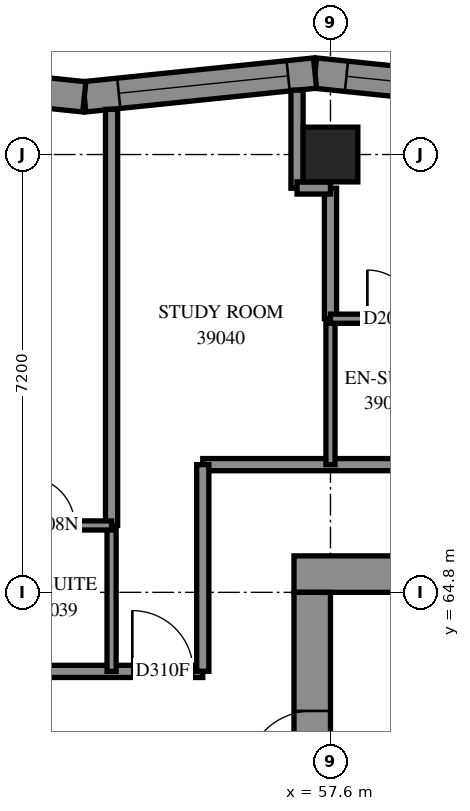
"""IFC4 building model, lengths in metres.
Left out: names, types, materials, properties, quantities, classifications, styles, units other than length and angle.
Written with IfcOpenShell. Run it as: python <this file> out.ifc"""

import sys

from ifc_helpers import new_model, si_unit, direction, frame, frame_2d, origin, origin_2d, place, context, subcontext, project, spatial, polyline, rectangle, outline, extrude, element, fill, save


model = new_model("IFC4")
c1 = context("Model", 3, precision=1e-05, world=origin(), true_north=direction((0.0, 1.0)))
c2 = subcontext(c1, "Body", "Model", "MODEL_VIEW")
j1 = project(units=[si_unit("LENGTHUNIT", "METRE"), si_unit("PLANEANGLEUNIT", "RADIAN")], contexts=[c1])
p1 = place(None, origin())
s1 = spatial("IfcSite", under=j1, at=p1, CompositionType="ELEMENT")
p2 = place(p1, origin())
s2 = spatial("IfcBuilding", under=s1, at=p2, CompositionType="ELEMENT")
p3 = place(p2, frame((0.0, 0.0, 145.6)))
s3 = spatial("IfcBuildingStorey", under=s2, at=p3, CompositionType="ELEMENT", Elevation=145.6)
p4 = place(p3, frame((57.6, 72.0, 0.0), z_axis=(0.0, 0.0, 1.0), x_axis=(1.0, 0.0, 0.0)))
e1 = element("IfcColumn", 1, at=p4, inside=s3, PredefinedType="COLUMN", context=c2, shape_type="SweptSolid", body=[
    extrude(rectangle(XDim=0.9, YDim=0.9, at=origin_2d()), origin(), (0.0, 0.0, 1.0), 3.1),
])
p5 = place(p3, frame((57.0, 65.1, -0.3), z_axis=(0.0, 0.0, 1.0), x_axis=(1.0, 0.0, 0.0)))
e2 = element("IfcWall", 2, at=p5, inside=s3, PredefinedType="SHEAR", context=c2, shape_type="SweptSolid", body=[
    extrude(rectangle(XDim=15.6, YDim=0.6, at=frame_2d((7.8, 0.0))), origin(), (0.0, 0.0, 1.0), 2.7),
])
p6 = place(p5, frame((10.6, 0.0, 0.3)))
e3 = element("IfcOpeningElement", 3, at=p6, cuts=e2, PredefinedType="OPENING", context=c2, shape_type="SweptSolid", body=[
    extrude(rectangle(XDim=0.8, YDim=2.1, at=frame_2d((0.4, 1.05))), frame((0.0, 0.31, 0.0), z_axis=(0.0, -1.0, 0.0), x_axis=(1.0, 0.0, 0.0)), (0.0, 0.0, 1.0), 0.62),
])
p7 = place(p3, frame((57.3, 50.4, -0.3), z_axis=(0.0, 0.0, 1.0), x_axis=(0.0, 1.0, 0.0)))
e4 = element("IfcWall", 4, at=p7, inside=s3, PredefinedType="SHEAR", context=c2, shape_type="SweptSolid", body=[
    extrude(rectangle(XDim=14.4, YDim=0.6, at=frame_2d((7.2, 0.0))), origin(), (0.0, 0.0, 1.0), 2.7),
])
p8 = place(p7, frame((4.55, 0.0, 0.3)))
e5 = element("IfcOpeningElement", 5, at=p8, cuts=e4, PredefinedType="OPENING", context=c2, shape_type="SweptSolid", body=[
    extrude(rectangle(XDim=1.1, YDim=2.1, at=frame_2d((0.55, 1.05))), frame((0.0, 0.31, 0.0), z_axis=(0.0, -1.0, 0.0), x_axis=(1.0, 0.0, 0.0)), (0.0, 0.0, 1.0), 0.62),
])
p9 = place(p7, frame((11.35, 0.0, 0.3)))
e6 = element("IfcOpeningElement", 6, at=p9, cuts=e4, PredefinedType="OPENING", context=c2, shape_type="SweptSolid", body=[
    extrude(rectangle(XDim=1.1, YDim=2.1, at=frame_2d((0.55, 1.05))), frame((0.0, 0.31, 0.0), z_axis=(0.0, -1.0, 0.0), x_axis=(1.0, 0.0, 0.0)), (0.0, 0.0, 1.0), 0.62),
])
p10 = place(p3, frame((61.139, 72.949, 0.0), z_axis=(0.0, 0.0, 1.0), x_axis=(-0.9947306832, 0.1025225234, 0.0)))
e7 = element("IfcWall", 7, at=p10, inside=s3, PredefinedType="SOLIDWALL", context=c2, shape_type="SweptSolid", body=[
    extrude(outline(polyline([(0.026, -0.25), (3.84, -0.25), (3.788, 0.25), (-0.026, 0.25), (0.026, -0.25)])), origin(), (0.0, 0.0, 1.0), 3.1),
])
p11 = place(p10, frame((0.494, 0.0, 0.45)))
e8 = element("IfcOpeningElement", 8, at=p11, cuts=e7, PredefinedType="OPENING", context=c2, shape_type="SweptSolid", body=[
    extrude(rectangle(XDim=2.8, YDim=2.5, at=frame_2d((1.4, 1.25))), frame((0.0, 0.26, 0.0), z_axis=(0.0, -1.0, 0.0), x_axis=(1.0, 0.0, 0.0)), (0.0, 0.0, 1.0), 0.52),
])
p12 = place(p3, frame((57.346, 73.34, 0.0), z_axis=(0.0, 0.0, 1.0), x_axis=(-0.9947304076, -0.1025251975, 0.0)))
e9 = element("IfcWall", 9, at=p12, inside=s3, PredefinedType="SOLIDWALL", context=c2, shape_type="SweptSolid", body=[
    extrude(outline(polyline([(-0.026, -0.25), (3.788, -0.25), (3.84, 0.25), (0.026, 0.25), (-0.026, -0.25)])), origin(), (0.0, 0.0, 1.0), 3.1),
])
p13 = place(p12, frame((0.445, 0.0, 0.45)))
e10 = element("IfcOpeningElement", 10, at=p13, cuts=e9, PredefinedType="OPENING", context=c2, shape_type="SweptSolid", body=[
    extrude(rectangle(XDim=2.8, YDim=2.5, at=frame_2d((1.4, 1.25))), frame((0.0, 0.26, 0.0), z_axis=(0.0, -1.0, 0.0), x_axis=(1.0, 0.0, 0.0)), (0.0, 0.0, 1.0), 0.52),
])
p14 = place(p3, frame((53.552, 72.949, 0.0), z_axis=(0.0, 0.0, 1.0), x_axis=(-0.9947306832, 0.1025225234, 0.0)))
e11 = element("IfcWall", 11, at=p14, inside=s3, PredefinedType="SOLIDWALL", context=c2, shape_type="SweptSolid", body=[
    extrude(outline(polyline([(0.026, -0.25), (3.84, -0.25), (3.788, 0.25), (-0.026, 0.25), (0.026, -0.25)])), origin(), (0.0, 0.0, 1.0), 3.1),
])
p15 = place(p14, frame((1.084, 0.0, 0.45)))
e12 = element("IfcOpeningElement", 12, at=p15, cuts=e11, PredefinedType="OPENING", context=c2, shape_type="SweptSolid", body=[
    extrude(rectangle(XDim=1.2, YDim=2.5, at=frame_2d((0.6, 1.25))), frame((0.0, 0.26, 0.0), z_axis=(0.0, -1.0, 0.0), x_axis=(1.0, 0.0, 0.0)), (0.0, 0.0, 1.0), 0.52),
])
p16 = place(p3, frame((55.5, 66.9, 0.0), z_axis=(0.0, 0.0, 1.0), x_axis=(1.0, 0.0, 0.0)))
e13 = element("IfcWall", 13, at=p16, inside=s3, PredefinedType="PARTITIONING", context=c2, shape_type="SweptSolid", body=[
    extrude(rectangle(XDim=18.6, YDim=0.2, at=frame_2d((9.3, 0.0))), origin(), (0.0, 0.0, 1.0), 3.1),
])
p17 = place(p16, frame((4.4, 0.0, 0.0)))
e14 = element("IfcOpeningElement", 14, at=p17, cuts=e13, PredefinedType="OPENING", context=c2, shape_type="SweptSolid", body=[
    extrude(rectangle(XDim=0.9, YDim=2.1, at=frame_2d((0.45, 1.05))), frame((0.0, 0.11, 0.0), z_axis=(0.0, -1.0, 0.0), x_axis=(1.0, 0.0, 0.0)), (0.0, 0.0, 1.0), 0.22),
])
p18 = place(p16, frame((6.1, 0.0, 0.0)))
e15 = element("IfcOpeningElement", 15, at=p18, cuts=e13, PredefinedType="OPENING", context=c2, shape_type="SweptSolid", body=[
    extrude(rectangle(XDim=0.9, YDim=2.1, at=frame_2d((0.45, 1.05))), frame((0.0, 0.11, 0.0), z_axis=(0.0, -1.0, 0.0), x_axis=(1.0, 0.0, 0.0)), (0.0, 0.0, 1.0), 0.22),
])
p19 = place(p16, frame((11.65, 0.0, 0.0)))
e16 = element("IfcOpeningElement", 16, at=p19, cuts=e13, PredefinedType="OPENING", context=c2, shape_type="SweptSolid", body=[
    extrude(rectangle(XDim=0.9, YDim=2.1, at=frame_2d((0.45, 1.05))), frame((0.0, 0.11, 0.0), z_axis=(0.0, -1.0, 0.0), x_axis=(1.0, 0.0, 0.0)), (0.0, 0.0, 1.0), 0.22),
])
p20 = place(p16, frame((13.3, 0.0, 0.0)))
e17 = element("IfcOpeningElement", 17, at=p20, cuts=e13, PredefinedType="OPENING", context=c2, shape_type="SweptSolid", body=[
    extrude(rectangle(XDim=0.9, YDim=2.1, at=frame_2d((0.45, 1.05))), frame((0.0, 0.11, 0.0), z_axis=(0.0, -1.0, 0.0), x_axis=(1.0, 0.0, 0.0)), (0.0, 0.0, 1.0), 0.22),
])
p21 = place(p3, frame((54.0, 65.9, 0.0), z_axis=(0.0, 0.0, 1.0), x_axis=(0.0, 1.0, 0.0)))
e18 = element("IfcWall", 18, at=p21, inside=s3, PredefinedType="PARTITIONING", context=c2, shape_type="SweptSolid", body=[
    extrude(rectangle(XDim=6.843, YDim=0.2, at=frame_2d((3.422, 0.0))), origin(), (0.0, 0.0, 1.0), 3.1),
])
p22 = place(p3, frame((50.4, 63.5, 0.0), z_axis=(0.0, 0.0, 1.0), x_axis=(1.0, 0.0, 0.0)))
e19 = element("IfcWall", 19, at=p22, inside=s3, PredefinedType="PARTITIONING", context=c2, shape_type="SweptSolid", body=[
    extrude(rectangle(XDim=5.1, YDim=0.2, at=frame_2d((2.55, 0.0))), origin(), (0.0, 0.0, 1.0), 3.1),
])
p23 = place(p22, frame((0.552, 0.0, 0.0)))
e20 = element("IfcOpeningElement", 20, at=p23, cuts=e19, PredefinedType="OPENING", context=c2, shape_type="SweptSolid", body=[
    extrude(rectangle(XDim=0.9, YDim=2.1, at=frame_2d((0.45, 1.05))), frame((0.0, 0.11, 0.0), z_axis=(0.0, -1.0, 0.0), x_axis=(1.0, 0.0, 0.0)), (0.0, 0.0, 1.0), 0.22),
])
p24 = place(p22, frame((3.941, 0.0, 0.0)))
e21 = element("IfcOpeningElement", 21, at=p24, cuts=e19, PredefinedType="OPENING", context=c2, shape_type="SweptSolid", body=[
    extrude(rectangle(XDim=1.0, YDim=2.1, at=frame_2d((0.5, 1.05))), frame((0.0, 0.11, 0.0), z_axis=(0.0, -1.0, 0.0), x_axis=(1.0, 0.0, 0.0)), (0.0, 0.0, 1.0), 0.22),
])
p25 = place(p3, frame((55.5, 63.502, 0.0), z_axis=(0.0, 0.0, 1.0), x_axis=(0.0, 1.0, 0.0)))
e22 = element("IfcWall", 22, at=p25, inside=s3, PredefinedType="PARTITIONING", context=c2, shape_type="SweptSolid", body=[
    extrude(rectangle(XDim=3.398, YDim=0.2, at=frame_2d((1.699, 0.0))), origin(), (0.0, 0.0, 1.0), 3.1),
])
for number, where, z_axis, x_axis in (
    (23, (54.0, 63.5, 0.0), (0.0, 0.0, 1.0), (0.0, 1.0, 0.0)),
    (24, (57.6, 66.9, 0.0), (0.0, 0.0, 1.0), (0.0, 1.0, 0.0)),
):
    element("IfcWall", number, at=place(p3, frame(where, z_axis=z_axis, x_axis=x_axis)), inside=s3, PredefinedType="PARTITIONING", context=c2, shape_type="SweptSolid", body=[
        extrude(rectangle(XDim=2.4, YDim=0.15, at=frame_2d((1.2, 0.0))), origin(), (0.0, 0.0, 1.0), 3.1),
    ])
p26 = place(p3, frame((57.6, 69.3, 0.0), z_axis=(0.0, 0.0, 1.0), x_axis=(0.0, 1.0, 0.0)))
e25 = element("IfcWall", 25, at=p26, inside=s3, PredefinedType="PARTITIONING", context=c2, shape_type="SweptSolid", body=[
    extrude(rectangle(XDim=2.146, YDim=0.2, at=frame_2d((1.073, 0.0))), origin(), (0.0, 0.0, 1.0), 3.1),
])
p27 = place(p3, frame((52.1, 65.9, 0.0), z_axis=(0.0, 0.0, 1.0), x_axis=(1.0, 0.0, 0.0)))
e26 = element("IfcWall", 26, at=p27, inside=s3, PredefinedType="PARTITIONING", context=c2, shape_type="SweptSolid", body=[
    extrude(rectangle(XDim=1.9, YDim=0.15, at=frame_2d((0.95, 0.0))), origin(), (0.0, 0.0, 1.0), 3.1),
])
p28 = place(p27, frame((0.493, 0.0, 0.0)))
e27 = element("IfcOpeningElement", 27, at=p28, cuts=e26, PredefinedType="OPENING", context=c2, shape_type="SweptSolid", body=[
    extrude(rectangle(XDim=0.8, YDim=2.1, at=frame_2d((0.4, 1.05))), frame((0.0, 0.085, 0.0), z_axis=(0.0, -1.0, 0.0), x_axis=(1.0, 0.0, 0.0)), (0.0, 0.0, 1.0), 0.17),
])
p29 = place(p3, frame((57.6, 69.3, 0.0), z_axis=(0.0, 0.0, 1.0), x_axis=(1.0, 0.0, 0.0)))
e28 = element("IfcWall", 28, at=p29, inside=s3, PredefinedType="PARTITIONING", context=c2, shape_type="SweptSolid", body=[
    extrude(rectangle(XDim=1.9, YDim=0.15, at=frame_2d((0.95, 0.0))), origin(), (0.0, 0.0, 1.0), 3.1),
])
p30 = place(p29, frame((0.607, 0.0, 0.0)))
e29 = element("IfcOpeningElement", 29, at=p30, cuts=e28, PredefinedType="OPENING", context=c2, shape_type="SweptSolid", body=[
    extrude(rectangle(XDim=0.8, YDim=2.1, at=frame_2d((0.4, 1.05))), frame((0.0, 0.085, 0.0), z_axis=(0.0, -1.0, 0.0), x_axis=(1.0, 0.0, 0.0)), (0.0, 0.0, 1.0), 0.17),
])
p31 = place(p3, frame((57.05, 71.446, 0.0), z_axis=(0.0, 0.0, 1.0), x_axis=(0.0, 1.0, 0.0)))
e30 = element("IfcWall", 30, at=p31, inside=s3, PredefinedType="PARTITIONING", context=c2, shape_type="SweptSolid", body=[
    extrude(rectangle(XDim=1.612, YDim=0.2, at=frame_2d((0.806, 0.0))), origin(), (0.0, 0.0, 1.0), 3.1),
])
p32 = place(p3, frame((57.05, 71.45, 0.0), z_axis=(0.0, 0.0, 1.0), x_axis=(1.0, 0.0, 0.0)))
e31 = element("IfcWall", 31, at=p32, inside=s3, PredefinedType="PARTITIONING", context=c2, shape_type="SweptSolid", body=[
    extrude(rectangle(XDim=0.55, YDim=0.2, at=frame_2d((0.275, 0.0))), origin(), (0.0, 0.0, 1.0), 3.1),
])
p33 = place(p11, origin())
e32 = element("IfcWindow", 32, at=p33, inside=s3, PartitioningType="SINGLE_PANEL", PredefinedType="WINDOW", context=c2, shape_type="SweptSolid", body=[
    extrude(rectangle(XDim=2.8, YDim=2.5, at=frame_2d((1.4, 1.25))), frame((0.0, 0.18, 0.0), z_axis=(0.0, -1.0, 0.0), x_axis=(1.0, 0.0, 0.0)), (0.0, 0.0, 1.0), 0.06),
])
fill(e8, e32)
p34 = place(p13, origin())
e33 = element("IfcWindow", 33, at=p34, inside=s3, PartitioningType="SINGLE_PANEL", PredefinedType="WINDOW", context=c2, shape_type="SweptSolid", body=[
    extrude(rectangle(XDim=2.8, YDim=2.5, at=frame_2d((1.4, 1.25))), frame((0.0, 0.18, 0.0), z_axis=(0.0, -1.0, 0.0), x_axis=(1.0, 0.0, 0.0)), (0.0, 0.0, 1.0), 0.06),
])
fill(e10, e33)
p35 = place(p9, origin())
e34 = element("IfcDoor", 34, at=p35, inside=s3, OperationType="SINGLE_SWING_LEFT", PredefinedType="DOOR", context=c2, shape_type="SweptSolid", body=[
    extrude(rectangle(XDim=1.1, YDim=2.1, at=frame_2d((0.55, 1.05))), frame((0.0, 0.025, 0.0), z_axis=(0.0, -1.0, 0.0), x_axis=(1.0, 0.0, 0.0)), (0.0, 0.0, 1.0), 0.05),
])
fill(e6, e34)
p36 = place(p30, origin())
e35 = element("IfcDoor", 35, at=p36, inside=s3, OperationType="SINGLE_SWING_RIGHT", PredefinedType="DOOR", context=c2, shape_type="SweptSolid", body=[
    extrude(rectangle(XDim=0.8, YDim=2.1, at=frame_2d((0.4, 1.05))), frame((0.0, 0.025, 0.0), z_axis=(0.0, -1.0, 0.0), x_axis=(1.0, 0.0, 0.0)), (0.0, 0.0, 1.0), 0.05),
])
fill(e29, e35)
p37 = place(p28, origin())
e36 = element("IfcDoor", 36, at=p37, inside=s3, OperationType="SINGLE_SWING_RIGHT", PredefinedType="DOOR", context=c2, shape_type="SweptSolid", body=[
    extrude(rectangle(XDim=0.8, YDim=2.1, at=frame_2d((0.4, 1.05))), frame((0.0, 0.025, 0.0), z_axis=(0.0, -1.0, 0.0), x_axis=(1.0, 0.0, 0.0)), (0.0, 0.0, 1.0), 0.05),
])
fill(e27, e36)
p38 = place(p24, origin())
e37 = element("IfcDoor", 37, at=p38, inside=s3, OperationType="SINGLE_SWING_LEFT", PredefinedType="DOOR", context=c2, shape_type="SweptSolid", body=[
    extrude(rectangle(XDim=1.0, YDim=2.1, at=frame_2d((0.5, 1.05))), frame((0.0, 0.025, 0.0), z_axis=(0.0, -1.0, 0.0), x_axis=(1.0, 0.0, 0.0)), (0.0, 0.0, 1.0), 0.05),
])
fill(e21, e37)
save(model, sys.argv[1])
